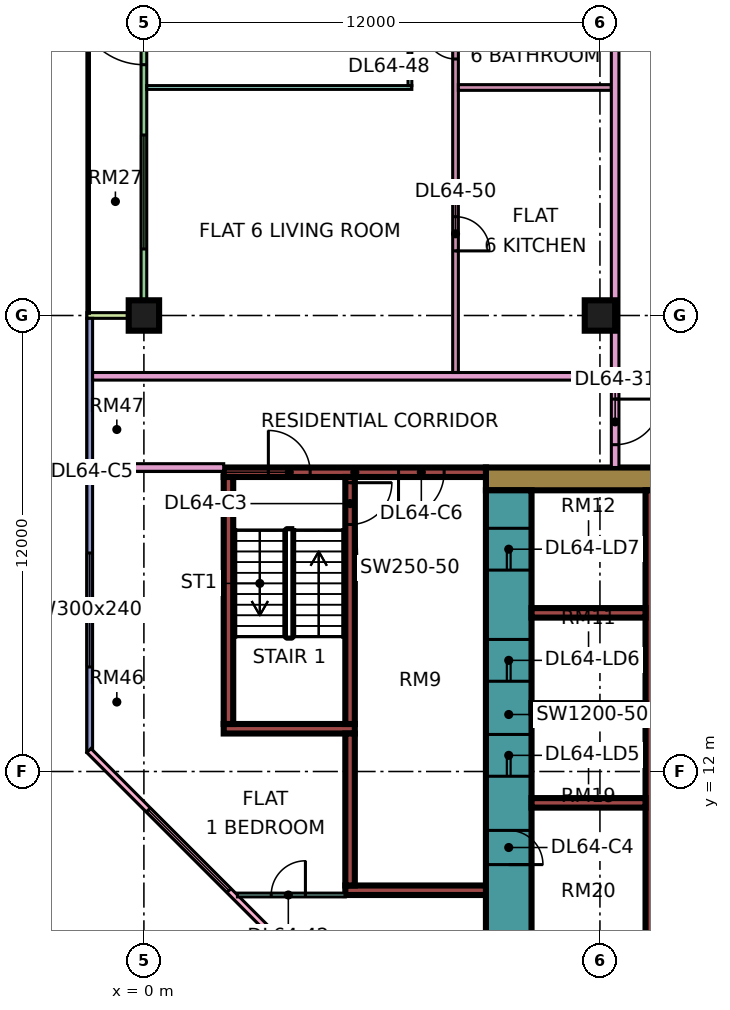
"""IFC4 building model, lengths in metres.
Left out: names, types, materials, properties, quantities, classifications, styles, units other than length and angle.
Written with IfcOpenShell. Run it as: python <this file> out.ifc"""

import sys

from ifc_helpers import new_model, si_unit, direction, frame, frame_2d, origin, origin_2d, place, context, subcontext, project, spatial, rectangle, extrude, element, fill, save


model = new_model("IFC4")
c1 = context("Model", 3, precision=1e-05, world=origin(), true_north=direction((0.0, 1.0)))
c2 = subcontext(c1, "Body", "Model", "MODEL_VIEW")
j1 = project(units=[si_unit("LENGTHUNIT", "METRE"), si_unit("PLANEANGLEUNIT", "RADIAN")], contexts=[c1])
p1 = place(None, origin())
s1 = spatial("IfcSite", under=j1, at=p1, CompositionType="ELEMENT")
p2 = place(p1, origin())
s2 = spatial("IfcBuilding", under=s1, at=p2, CompositionType="ELEMENT")
p3 = place(p2, frame((0.0, 0.0, 277.15)))
s3 = spatial("IfcBuildingStorey", under=s2, at=p3, CompositionType="ELEMENT", Elevation=277.15)
for number, where, z_axis, x_axis in (
    (1, (0.0, 24.0, 0.0), (0.0, 0.0, 1.0), (1.0, 0.0, 0.0)),
    (2, (12.0, 24.0, 0.0), (0.0, 0.0, 1.0), (1.0, 0.0, 0.0)),
):
    element("IfcColumn", number, at=place(p3, frame(where, z_axis=z_axis, x_axis=x_axis)), inside=s3, PredefinedType="COLUMN", context=c2, shape_type="SweptSolid", body=[
        extrude(rectangle(XDim=0.8, YDim=0.8, at=origin_2d()), origin(), (0.0, 0.0, 1.0), 3.75),
    ])
p4 = place(p3, frame((9.0, 19.7, 0.0), z_axis=(0.0, 0.0, 1.0), x_axis=(1.0, 0.0, 0.0)))
e3 = element("IfcWall", 3, at=p4, inside=s3, PredefinedType="SHEAR", context=c2, shape_type="SweptSolid", body=[
    extrude(rectangle(XDim=25.0, YDim=0.6, at=frame_2d((12.5, 0.0))), origin(), (0.0, 0.0, 1.0), 3.75),
])
p5 = place(p4, frame((19.1, 0.0, 0.0)))
e4 = element("IfcOpeningElement", 4, at=p5, cuts=e3, PredefinedType="OPENING", context=c2, shape_type="SweptSolid", body=[
    extrude(rectangle(XDim=1.8, YDim=2.4, at=frame_2d((0.9, 1.2))), frame((0.0, 0.31, 0.0), z_axis=(0.0, -1.0, 0.0), x_axis=(1.0, 0.0, 0.0)), (0.0, 0.0, 1.0), 0.62),
])
p6 = place(p3, frame((9.6, 7.6, 0.0), z_axis=(0.0, 0.0, 1.0), x_axis=(0.0, 1.0, 0.0)))
e5 = element("IfcWall", 5, at=p6, inside=s3, PredefinedType="SHEAR", context=c2, shape_type="SweptSolid", body=[
    extrude(rectangle(XDim=11.8, YDim=1.2, at=frame_2d((5.9, 0.0))), origin(), (0.0, 0.0, 1.0), 3.75),
])
p7 = place(p6, frame((4.275, 0.0, 0.0)))
e6 = element("IfcOpeningElement", 6, at=p7, cuts=e5, PredefinedType="OPENING", context=c2, shape_type="SweptSolid", body=[
    extrude(rectangle(XDim=1.1, YDim=2.2, at=frame_2d((0.55, 1.1))), frame((0.0, 0.61, 0.0), z_axis=(0.0, -1.0, 0.0), x_axis=(1.0, 0.0, 0.0)), (0.0, 0.0, 1.0), 1.22),
])
p8 = place(p6, frame((6.775, 0.0, 0.0)))
e7 = element("IfcOpeningElement", 7, at=p8, cuts=e5, PredefinedType="OPENING", context=c2, shape_type="SweptSolid", body=[
    extrude(rectangle(XDim=1.1, YDim=2.2, at=frame_2d((0.55, 1.1))), frame((0.0, 0.61, 0.0), z_axis=(0.0, -1.0, 0.0), x_axis=(1.0, 0.0, 0.0)), (0.0, 0.0, 1.0), 1.22),
])
p9 = place(p6, frame((9.7, 0.0, 0.0)))
e8 = element("IfcOpeningElement", 8, at=p9, cuts=e5, PredefinedType="OPENING", context=c2, shape_type="SweptSolid", body=[
    extrude(rectangle(XDim=1.1, YDim=2.2, at=frame_2d((0.55, 1.1))), frame((0.0, 0.61, 0.0), z_axis=(0.0, -1.0, 0.0), x_axis=(1.0, 0.0, 0.0)), (0.0, 0.0, 1.0), 1.22),
])
p10 = place(p6, frame((1.95, 0.0, 0.0)))
e9 = element("IfcOpeningElement", 9, at=p10, cuts=e5, PredefinedType="OPENING", context=c2, shape_type="SweptSolid", body=[
    extrude(rectangle(XDim=0.9, YDim=2.1, at=frame_2d((0.45, 1.05))), frame((0.0, 0.61, 0.0), z_axis=(0.0, -1.0, 0.0), x_axis=(1.0, 0.0, 0.0)), (0.0, 0.0, 1.0), 1.22),
])
p11 = place(p3, frame((13.325, 7.6, 0.0), z_axis=(0.0, 0.0, 1.0), x_axis=(0.0, 1.0, 0.0)))
e10 = element("IfcWall", 10, at=p11, inside=s3, PredefinedType="SHEAR", context=c2, shape_type="SweptSolid", body=[
    extrude(rectangle(XDim=11.8, YDim=0.25, at=frame_2d((5.9, 0.0))), origin(), (0.0, 0.0, 1.0), 3.75),
])
for number, where, z_axis, x_axis in (
    (11, (10.2, 11.175, 0.0), (0.0, 0.0, 1.0), (1.0, 0.0, 0.0)),
    (12, (10.2, 13.675, 0.0), (0.0, 0.0, 1.0), (1.0, 0.0, 0.0)),
    (13, (10.2, 16.175, 0.0), (0.0, 0.0, 1.0), (1.0, 0.0, 0.0)),
):
    element("IfcWall", number, at=place(p3, frame(where, z_axis=z_axis, x_axis=x_axis)), inside=s3, PredefinedType="SHEAR", context=c2, shape_type="SweptSolid", body=[
        extrude(rectangle(XDim=3.0, YDim=0.25, at=frame_2d((1.5, 0.0))), origin(), (0.0, 0.0, 1.0), 3.75),
    ])
p12 = place(p3, frame((2.1, 19.875, 0.0), z_axis=(0.0, 0.0, 1.0), x_axis=(1.0, 0.0, 0.0)))
e14 = element("IfcWall", 14, at=p12, inside=s3, PredefinedType="SHEAR", context=c2, shape_type="SweptSolid", body=[
    extrude(rectangle(XDim=6.9, YDim=0.25, at=frame_2d((3.45, 0.0))), origin(), (0.0, 0.0, 1.0), 3.75),
])
p13 = place(p12, frame((1.175, 0.0, 0.0)))
e15 = element("IfcOpeningElement", 15, at=p13, cuts=e14, PredefinedType="OPENING", context=c2, shape_type="SweptSolid", body=[
    extrude(rectangle(XDim=1.1, YDim=2.2, at=frame_2d((0.55, 1.1))), frame((0.0, 0.135, 0.0), z_axis=(0.0, -1.0, 0.0), x_axis=(1.0, 0.0, 0.0)), (0.0, 0.0, 1.0), 0.27),
])
p14 = place(p12, frame((4.6, 0.0, 0.0)))
e16 = element("IfcOpeningElement", 16, at=p14, cuts=e14, PredefinedType="OPENING", context=c2, shape_type="SweptSolid", body=[
    extrude(rectangle(XDim=1.2, YDim=2.2, at=frame_2d((0.6, 1.1))), frame((0.0, 0.135, 0.0), z_axis=(0.0, -1.0, 0.0), x_axis=(1.0, 0.0, 0.0)), (0.0, 0.0, 1.0), 0.27),
])
p15 = place(p3, frame((2.1, 13.125, 0.0), z_axis=(0.0, 0.0, 1.0), x_axis=(1.0, 0.0, 0.0)))
e17 = element("IfcWall", 17, at=p15, inside=s3, PredefinedType="SHEAR", context=c2, shape_type="SweptSolid", body=[
    extrude(rectangle(XDim=3.45, YDim=0.25, at=frame_2d((1.725, 0.0))), origin(), (0.0, 0.0, 1.0), 3.75),
])
p16 = place(p3, frame((2.225, 13.25, 0.0), z_axis=(0.0, 0.0, 1.0), x_axis=(0.0, 1.0, 0.0)))
e18 = element("IfcWall", 18, at=p16, inside=s3, PredefinedType="SHEAR", context=c2, shape_type="SweptSolid", body=[
    extrude(rectangle(XDim=6.5, YDim=0.25, at=frame_2d((3.25, 0.0))), origin(), (0.0, 0.0, 1.0), 3.75),
])
p17 = place(p3, frame((5.425, 13.25, 0.0), z_axis=(0.0, 0.0, 1.0), x_axis=(0.0, 1.0, 0.0)))
e19 = element("IfcWall", 19, at=p17, inside=s3, PredefinedType="SHEAR", context=c2, shape_type="SweptSolid", body=[
    extrude(rectangle(XDim=6.5, YDim=0.25, at=frame_2d((3.25, 0.0))), origin(), (0.0, 0.0, 1.0), 3.75),
])
p18 = place(p17, frame((5.25, 0.0, 0.0)))
e20 = element("IfcOpeningElement", 20, at=p18, cuts=e19, PredefinedType="OPENING", context=c2, shape_type="SweptSolid", body=[
    extrude(rectangle(XDim=1.1, YDim=2.2, at=frame_2d((0.55, 1.1))), frame((0.0, 0.135, 0.0), z_axis=(0.0, -1.0, 0.0), x_axis=(1.0, 0.0, 0.0)), (0.0, 0.0, 1.0), 0.27),
])
p19 = place(p3, frame((5.3, 8.875, 0.0), z_axis=(0.0, 0.0, 1.0), x_axis=(1.0, 0.0, 0.0)))
e21 = element("IfcWall", 21, at=p19, inside=s3, PredefinedType="SHEAR", context=c2, shape_type="SweptSolid", body=[
    extrude(rectangle(XDim=3.7, YDim=0.25, at=frame_2d((1.85, 0.0))), origin(), (0.0, 0.0, 1.0), 3.75),
])
p20 = place(p3, frame((5.425, 9.0, 0.0), z_axis=(0.0, 0.0, 1.0), x_axis=(0.0, 1.0, 0.0)))
e22 = element("IfcWall", 22, at=p20, inside=s3, PredefinedType="SHEAR", context=c2, shape_type="SweptSolid", body=[
    extrude(rectangle(XDim=4.0, YDim=0.25, at=frame_2d((2.0, 0.0))), origin(), (0.0, 0.0, 1.0), 3.75),
])
p21 = place(p3, frame((0.0, 35.925, 0.0), z_axis=(0.0, 0.0, 1.0), x_axis=(0.0, -1.0, 0.0)))
e23 = element("IfcWall", 23, at=p21, inside=s3, PredefinedType="SOLIDWALL", context=c2, shape_type="SweptSolid", body=[
    extrude(rectangle(XDim=11.85, YDim=0.15, at=frame_2d((5.925, 0.0))), origin(), (0.0, 0.0, 1.0), 3.35),
])
p22 = place(p21, frame((0.775, 0.0, 0.45)))
e24 = element("IfcOpeningElement", 24, at=p22, cuts=e23, PredefinedType="OPENING", context=c2, shape_type="SweptSolid", body=[
    extrude(rectangle(XDim=1.8, YDim=2.4, at=frame_2d((0.9, 1.2))), frame((0.0, 0.085, 0.0), z_axis=(0.0, -1.0, 0.0), x_axis=(1.0, 0.0, 0.0)), (0.0, 0.0, 1.0), 0.17),
])
p23 = place(p21, frame((3.525, 0.0, 0.0)))
e25 = element("IfcOpeningElement", 25, at=p23, cuts=e23, PredefinedType="OPENING", context=c2, shape_type="SweptSolid", body=[
    extrude(rectangle(XDim=1.8, YDim=2.4, at=frame_2d((0.9, 1.2))), frame((0.0, 0.085, 0.0), z_axis=(0.0, -1.0, 0.0), x_axis=(1.0, 0.0, 0.0)), (0.0, 0.0, 1.0), 0.17),
])
p24 = place(p21, frame((7.175, 0.0, 0.45)))
e26 = element("IfcOpeningElement", 26, at=p24, cuts=e23, PredefinedType="OPENING", context=c2, shape_type="SweptSolid", body=[
    extrude(rectangle(XDim=3.0, YDim=2.4, at=frame_2d((1.5, 1.2))), frame((0.0, 0.085, 0.0), z_axis=(0.0, -1.0, 0.0), x_axis=(1.0, 0.0, 0.0)), (0.0, 0.0, 1.0), 0.17),
])
p25 = place(p3, frame((-1.5, 24.0, 0.0), z_axis=(0.0, 0.0, 1.0), x_axis=(1.0, 0.0, 0.0)))
e27 = element("IfcWall", 27, at=p25, inside=s3, PredefinedType="SOLIDWALL", context=c2, shape_type="SweptSolid", body=[
    extrude(rectangle(XDim=1.5, YDim=0.15, at=frame_2d((0.75, 0.0))), origin(), (0.0, 0.0, 1.0), 3.35),
])
p26 = place(p3, frame((-1.425, 23.925, 0.0), z_axis=(0.0, 0.0, 1.0), x_axis=(0.0, -1.0, 0.0)))
e28 = element("IfcWall", 28, at=p26, inside=s3, PredefinedType="SOLIDWALL", context=c2, shape_type="SweptSolid", body=[
    extrude(rectangle(XDim=11.425, YDim=0.15, at=frame_2d((5.712, 0.0))), origin(), (0.0, 0.0, 1.0), 3.35),
])
p27 = place(p26, frame((6.175, 0.0, 0.45)))
e29 = element("IfcOpeningElement", 29, at=p27, cuts=e28, PredefinedType="OPENING", context=c2, shape_type="SweptSolid", body=[
    extrude(rectangle(XDim=3.0, YDim=2.4, at=frame_2d((1.5, 1.2))), frame((0.0, 0.085, 0.0), z_axis=(0.0, -1.0, 0.0), x_axis=(1.0, 0.0, 0.0)), (0.0, 0.0, 1.0), 0.17),
])
p28 = place(p3, frame((-1.447, 12.553, 0.0), z_axis=(0.0, 0.0, 1.0), x_axis=(0.707106781187, -0.707106781187, 0.0)))
e30 = element("IfcWall", 30, at=p28, inside=s3, PredefinedType="SOLIDWALL", context=c2, shape_type="SweptSolid", body=[
    extrude(rectangle(XDim=19.799, YDim=0.15, at=frame_2d((9.899, 0.0))), origin(), (0.0, 0.0, 1.0), 3.35),
])
p29 = place(p28, frame((2.212, 0.0, 0.45)))
e31 = element("IfcOpeningElement", 31, at=p29, cuts=e30, PredefinedType="OPENING", context=c2, shape_type="SweptSolid", body=[
    extrude(rectangle(XDim=3.0, YDim=2.4, at=frame_2d((1.5, 1.2))), frame((0.0, 0.085, 0.0), z_axis=(0.0, -1.0, 0.0), x_axis=(1.0, 0.0, 0.0)), (0.0, 0.0, 1.0), 0.17),
])
p30 = place(p28, frame((10.216, 0.0, 0.45)))
e32 = element("IfcOpeningElement", 32, at=p30, cuts=e30, PredefinedType="OPENING", context=c2, shape_type="SweptSolid", body=[
    extrude(rectangle(XDim=3.0, YDim=2.4, at=frame_2d((1.5, 1.2))), frame((0.0, 0.085, 0.0), z_axis=(0.0, -1.0, 0.0), x_axis=(1.0, 0.0, 0.0)), (0.0, 0.0, 1.0), 0.17),
])
p31 = place(p3, frame((-1.35, 20.0, 0.0), z_axis=(0.0, 0.0, 1.0), x_axis=(1.0, 0.0, 0.0)))
e33 = element("IfcWall", 33, at=p31, inside=s3, PredefinedType="PARTITIONING", context=c2, shape_type="SweptSolid", body=[
    extrude(rectangle(XDim=3.45, YDim=0.2, at=frame_2d((1.725, 0.0))), origin(), (0.0, 0.0, 1.0), 3.35),
])
p32 = place(p3, frame((-1.35, 22.4, 0.0), z_axis=(0.0, 0.0, 1.0), x_axis=(1.0, 0.0, 0.0)))
e34 = element("IfcWall", 34, at=p32, inside=s3, PredefinedType="PARTITIONING", context=c2, shape_type="SweptSolid", body=[
    extrude(rectangle(XDim=13.65, YDim=0.2, at=frame_2d((6.825, 0.0))), origin(), (0.0, 0.0, 1.0), 3.35),
])
p33 = place(p3, frame((0.074, 30.0, 0.0), z_axis=(0.0, 0.0, 1.0), x_axis=(1.0, 0.0, 0.0)))
e35 = element("IfcWall", 35, at=p33, inside=s3, PredefinedType="PARTITIONING", context=c2, shape_type="SweptSolid", body=[
    extrude(rectangle(XDim=6.976, YDim=0.1, at=frame_2d((3.488, 0.0))), origin(), (0.0, 0.0, 1.0), 3.35),
])
p34 = place(p3, frame((2.461, 8.75, 0.0), z_axis=(0.0, 0.0, 1.0), x_axis=(1.0, 0.0, 0.0)))
e36 = element("IfcWall", 36, at=p34, inside=s3, PredefinedType="PARTITIONING", context=c2, shape_type="SweptSolid", body=[
    extrude(rectangle(XDim=2.839, YDim=0.1, at=frame_2d((1.419, 0.0))), origin(), (0.0, 0.0, 1.0), 3.35),
])
p35 = place(p34, frame((0.889, 0.0, 0.0)))
e37 = element("IfcOpeningElement", 37, at=p35, cuts=e36, PredefinedType="OPENING", context=c2, shape_type="SweptSolid", body=[
    extrude(rectangle(XDim=0.9, YDim=2.1, at=frame_2d((0.45, 1.05))), frame((0.0, 0.06, 0.0), z_axis=(0.0, -1.0, 0.0), x_axis=(1.0, 0.0, 0.0)), (0.0, 0.0, 1.0), 0.12),
])
p36 = place(p3, frame((7.0, 30.05, 0.0), z_axis=(0.0, 0.0, 1.0), x_axis=(0.0, 1.0, 0.0)))
e38 = element("IfcWall", 38, at=p36, inside=s3, PredefinedType="PARTITIONING", context=c2, shape_type="SweptSolid", body=[
    extrude(rectangle(XDim=5.85, YDim=0.1, at=frame_2d((2.925, 0.0))), origin(), (0.0, 0.0, 1.0), 3.35),
])
p37 = place(p36, frame((1.0, 0.0, 0.0)))
e39 = element("IfcOpeningElement", 39, at=p37, cuts=e38, PredefinedType="OPENING", context=c2, shape_type="SweptSolid", body=[
    extrude(rectangle(XDim=0.9, YDim=2.1, at=frame_2d((0.45, 1.05))), frame((0.0, 0.06, 0.0), z_axis=(0.0, -1.0, 0.0), x_axis=(1.0, 0.0, 0.0)), (0.0, 0.0, 1.0), 0.12),
])
p38 = place(p36, frame((4.0, 0.0, 0.0)))
e40 = element("IfcOpeningElement", 40, at=p38, cuts=e38, PredefinedType="OPENING", context=c2, shape_type="SweptSolid", body=[
    extrude(rectangle(XDim=0.9, YDim=2.1, at=frame_2d((0.45, 1.05))), frame((0.0, 0.06, 0.0), z_axis=(0.0, -1.0, 0.0), x_axis=(1.0, 0.0, 0.0)), (0.0, 0.0, 1.0), 0.12),
])
p39 = place(p3, frame((8.2, 22.5, 0.0), z_axis=(0.0, 0.0, 1.0), x_axis=(0.0, 1.0, 0.0)))
e41 = element("IfcWall", 41, at=p39, inside=s3, PredefinedType="PARTITIONING", context=c2, shape_type="SweptSolid", body=[
    extrude(rectangle(XDim=9.975, YDim=0.15, at=frame_2d((4.988, 0.0))), origin(), (0.0, 0.0, 1.0), 3.35),
])
p40 = place(p39, frame((8.25, 0.0, 0.0)))
e42 = element("IfcOpeningElement", 42, at=p40, cuts=e41, PredefinedType="OPENING", context=c2, shape_type="SweptSolid", body=[
    extrude(rectangle(XDim=0.8, YDim=2.1, at=frame_2d((0.4, 1.05))), frame((0.0, 0.085, 0.0), z_axis=(0.0, -1.0, 0.0), x_axis=(1.0, 0.0, 0.0)), (0.0, 0.0, 1.0), 0.17),
])
p41 = place(p39, frame((3.2, 0.0, 0.0)))
e43 = element("IfcOpeningElement", 43, at=p41, cuts=e41, PredefinedType="OPENING", context=c2, shape_type="SweptSolid", body=[
    extrude(rectangle(XDim=0.9, YDim=2.1, at=frame_2d((0.45, 1.05))), frame((0.0, 0.085, 0.0), z_axis=(0.0, -1.0, 0.0), x_axis=(1.0, 0.0, 0.0)), (0.0, 0.0, 1.0), 0.17),
])
p42 = place(p3, frame((8.275, 30.0, 0.0), z_axis=(0.0, 0.0, 1.0), x_axis=(1.0, 0.0, 0.0)))
e44 = element("IfcWall", 44, at=p42, inside=s3, PredefinedType="PARTITIONING", context=c2, shape_type="SweptSolid", body=[
    extrude(rectangle(XDim=4.025, YDim=0.15, at=frame_2d((2.013, 0.0))), origin(), (0.0, 0.0, 1.0), 3.35),
])
p43 = place(p3, frame((12.4, 20.0, 0.0), z_axis=(0.0, 0.0, 1.0), x_axis=(0.0, 1.0, 0.0)))
e45 = element("IfcWall", 45, at=p43, inside=s3, PredefinedType="PARTITIONING", context=c2, shape_type="SweptSolid", body=[
    extrude(rectangle(XDim=34.0, YDim=0.2, at=frame_2d((17.0, 0.0))), origin(), (0.0, 0.0, 1.0), 3.35),
])
p44 = place(p43, frame((16.95, 0.0, 0.0)))
e46 = element("IfcOpeningElement", 46, at=p44, cuts=e45, PredefinedType="OPENING", context=c2, shape_type="SweptSolid", body=[
    extrude(rectangle(XDim=1.0, YDim=2.1, at=frame_2d((0.5, 1.05))), frame((0.0, 0.11, 0.0), z_axis=(0.0, -1.0, 0.0), x_axis=(1.0, 0.0, 0.0)), (0.0, 0.0, 1.0), 0.22),
])
p45 = place(p43, frame((0.6, 0.0, 0.0)))
e47 = element("IfcOpeningElement", 47, at=p45, cuts=e45, PredefinedType="OPENING", context=c2, shape_type="SweptSolid", body=[
    extrude(rectangle(XDim=1.2, YDim=2.1, at=frame_2d((0.6, 1.05))), frame((0.0, 0.11, 0.0), z_axis=(0.0, -1.0, 0.0), x_axis=(1.0, 0.0, 0.0)), (0.0, 0.0, 1.0), 0.22),
])
p46 = place(p43, frame((13.65, 0.0, 0.0)))
e48 = element("IfcOpeningElement", 48, at=p46, cuts=e45, PredefinedType="OPENING", context=c2, shape_type="SweptSolid", body=[
    extrude(rectangle(XDim=1.0, YDim=2.1, at=frame_2d((0.5, 1.05))), frame((0.0, 0.11, 0.0), z_axis=(0.0, -1.0, 0.0), x_axis=(1.0, 0.0, 0.0)), (0.0, 0.0, 1.0), 0.22),
])
p47 = place(p23, frame((1.8, 0.0, 0.0), z_axis=(0.0, 0.0, 1.0), x_axis=(-1.0, 0.0, 0.0)))
e49 = element("IfcDoor", 49, at=p47, inside=s3, OperationType="DOUBLE_DOOR_SINGLE_SWING", PredefinedType="DOOR", context=c2, shape_type="SweptSolid", body=[
    extrude(rectangle(XDim=1.8, YDim=2.4, at=frame_2d((0.9, 1.2))), frame((0.0, 0.025, 0.0), z_axis=(0.0, -1.0, 0.0), x_axis=(1.0, 0.0, 0.0)), (0.0, 0.0, 1.0), 0.05),
])
fill(e25, e49)
p48 = place(p24, origin())
e50 = element("IfcWindow", 50, at=p48, inside=s3, PartitioningType="SINGLE_PANEL", PredefinedType="WINDOW", context=c2, shape_type="SweptSolid", body=[
    extrude(rectangle(XDim=3.0, YDim=2.4, at=frame_2d((1.5, 1.2))), frame((0.0, 0.03, 0.0), z_axis=(0.0, -1.0, 0.0), x_axis=(1.0, 0.0, 0.0)), (0.0, 0.0, 1.0), 0.06),
])
fill(e26, e50)
p49 = place(p27, origin())
e51 = element("IfcWindow", 51, at=p49, inside=s3, PartitioningType="SINGLE_PANEL", PredefinedType="WINDOW", context=c2, shape_type="SweptSolid", body=[
    extrude(rectangle(XDim=3.0, YDim=2.4, at=frame_2d((1.5, 1.2))), frame((0.0, 0.03, 0.0), z_axis=(0.0, -1.0, 0.0), x_axis=(1.0, 0.0, 0.0)), (0.0, 0.0, 1.0), 0.06),
])
fill(e29, e51)
p50 = place(p29, origin())
e52 = element("IfcWindow", 52, at=p50, inside=s3, PartitioningType="SINGLE_PANEL", PredefinedType="WINDOW", context=c2, shape_type="SweptSolid", body=[
    extrude(rectangle(XDim=3.0, YDim=2.4, at=frame_2d((1.5, 1.2))), frame((0.0, 0.03, 0.0), z_axis=(0.0, -1.0, 0.0), x_axis=(1.0, 0.0, 0.0)), (0.0, 0.0, 1.0), 0.06),
])
fill(e31, e52)
p51 = place(p7, origin())
e53 = element("IfcDoor", 53, at=p51, inside=s3, OperationType="DOUBLE_DOOR_SLIDING", PredefinedType="DOOR", context=c2, shape_type="SweptSolid", body=[
    extrude(rectangle(XDim=1.1, YDim=2.2, at=frame_2d((0.55, 1.1))), frame((0.0, 0.025, 0.0), z_axis=(0.0, -1.0, 0.0), x_axis=(1.0, 0.0, 0.0)), (0.0, 0.0, 1.0), 0.05),
])
fill(e6, e53)
p52 = place(p8, origin())
e54 = element("IfcDoor", 54, at=p52, inside=s3, OperationType="DOUBLE_DOOR_SLIDING", PredefinedType="DOOR", context=c2, shape_type="SweptSolid", body=[
    extrude(rectangle(XDim=1.1, YDim=2.2, at=frame_2d((0.55, 1.1))), frame((0.0, 0.025, 0.0), z_axis=(0.0, -1.0, 0.0), x_axis=(1.0, 0.0, 0.0)), (0.0, 0.0, 1.0), 0.05),
])
fill(e7, e54)
p53 = place(p9, origin())
e55 = element("IfcDoor", 55, at=p53, inside=s3, OperationType="DOUBLE_DOOR_SLIDING", PredefinedType="DOOR", context=c2, shape_type="SweptSolid", body=[
    extrude(rectangle(XDim=1.1, YDim=2.2, at=frame_2d((0.55, 1.1))), frame((0.0, 0.025, 0.0), z_axis=(0.0, -1.0, 0.0), x_axis=(1.0, 0.0, 0.0)), (0.0, 0.0, 1.0), 0.05),
])
fill(e8, e55)
p54 = place(p18, origin())
e56 = element("IfcDoor", 56, at=p54, inside=s3, OperationType="SINGLE_SWING_RIGHT", PredefinedType="DOOR", context=c2, shape_type="SweptSolid", body=[
    extrude(rectangle(XDim=1.1, YDim=2.2, at=frame_2d((0.55, 1.1))), frame((0.0, 0.025, 0.0), z_axis=(0.0, -1.0, 0.0), x_axis=(1.0, 0.0, 0.0)), (0.0, 0.0, 1.0), 0.05),
])
fill(e20, e56)
p55 = place(p10, frame((0.9, 0.0, 0.0), z_axis=(0.0, 0.0, 1.0), x_axis=(-1.0, 0.0, 0.0)))
e57 = element("IfcDoor", 57, at=p55, inside=s3, OperationType="SINGLE_SWING_LEFT", PredefinedType="DOOR", context=c2, shape_type="SweptSolid", body=[
    extrude(rectangle(XDim=0.9, YDim=2.1, at=frame_2d((0.45, 1.05))), frame((0.0, 0.025, 0.0), z_axis=(0.0, -1.0, 0.0), x_axis=(1.0, 0.0, 0.0)), (0.0, 0.0, 1.0), 0.05),
])
fill(e9, e57)
p56 = place(p13, origin())
e58 = element("IfcDoor", 58, at=p56, inside=s3, OperationType="SINGLE_SWING_LEFT", PredefinedType="DOOR", context=c2, shape_type="SweptSolid", body=[
    extrude(rectangle(XDim=1.1, YDim=2.2, at=frame_2d((0.55, 1.1))), frame((0.0, 0.025, 0.0), z_axis=(0.0, -1.0, 0.0), x_axis=(1.0, 0.0, 0.0)), (0.0, 0.0, 1.0), 0.05),
])
fill(e15, e58)
p57 = place(p14, frame((1.2, 0.0, 0.0), z_axis=(0.0, 0.0, 1.0), x_axis=(-1.0, 0.0, 0.0)))
e59 = element("IfcDoor", 59, at=p57, inside=s3, OperationType="SINGLE_SWING_LEFT", PredefinedType="DOOR", context=c2, shape_type="SweptSolid", body=[
    extrude(rectangle(XDim=1.2, YDim=2.2, at=frame_2d((0.6, 1.1))), frame((0.0, 0.025, 0.0), z_axis=(0.0, -1.0, 0.0), x_axis=(1.0, 0.0, 0.0)), (0.0, 0.0, 1.0), 0.05),
])
fill(e16, e59)
p58 = place(p45, origin())
e60 = element("IfcDoor", 60, at=p58, inside=s3, OperationType="SINGLE_SWING_RIGHT", PredefinedType="DOOR", context=c2, shape_type="SweptSolid", body=[
    extrude(rectangle(XDim=1.2, YDim=2.1, at=frame_2d((0.6, 1.05))), frame((0.0, 0.025, 0.0), z_axis=(0.0, -1.0, 0.0), x_axis=(1.0, 0.0, 0.0)), (0.0, 0.0, 1.0), 0.05),
])
fill(e47, e60)
p59 = place(p35, frame((0.9, 0.0, 0.0), z_axis=(0.0, 0.0, 1.0), x_axis=(-1.0, 0.0, 0.0)))
e61 = element("IfcDoor", 61, at=p59, inside=s3, OperationType="SINGLE_SWING_RIGHT", PredefinedType="DOOR", context=c2, shape_type="SweptSolid", body=[
    extrude(rectangle(XDim=0.9, YDim=2.1, at=frame_2d((0.45, 1.05))), frame((0.0, 0.025, 0.0), z_axis=(0.0, -1.0, 0.0), x_axis=(1.0, 0.0, 0.0)), (0.0, 0.0, 1.0), 0.05),
])
fill(e37, e61)
p60 = place(p40, frame((0.8, 0.0, 0.0), z_axis=(0.0, 0.0, 1.0), x_axis=(-1.0, 0.0, 0.0)))
e62 = element("IfcDoor", 62, at=p60, inside=s3, OperationType="SINGLE_SWING_RIGHT", PredefinedType="DOOR", context=c2, shape_type="SweptSolid", body=[
    extrude(rectangle(XDim=0.8, YDim=2.1, at=frame_2d((0.4, 1.05))), frame((0.0, 0.025, 0.0), z_axis=(0.0, -1.0, 0.0), x_axis=(1.0, 0.0, 0.0)), (0.0, 0.0, 1.0), 0.05),
])
fill(e42, e62)
p61 = place(p41, frame((0.9, 0.0, 0.0), z_axis=(0.0, 0.0, 1.0), x_axis=(-1.0, 0.0, 0.0)))
e63 = element("IfcDoor", 63, at=p61, inside=s3, OperationType="SINGLE_SWING_LEFT", PredefinedType="DOOR", context=c2, shape_type="SweptSolid", body=[
    extrude(rectangle(XDim=0.9, YDim=2.1, at=frame_2d((0.45, 1.05))), frame((0.0, 0.025, 0.0), z_axis=(0.0, -1.0, 0.0), x_axis=(1.0, 0.0, 0.0)), (0.0, 0.0, 1.0), 0.05),
])
fill(e43, e63)
save(model, sys.argv[1])
